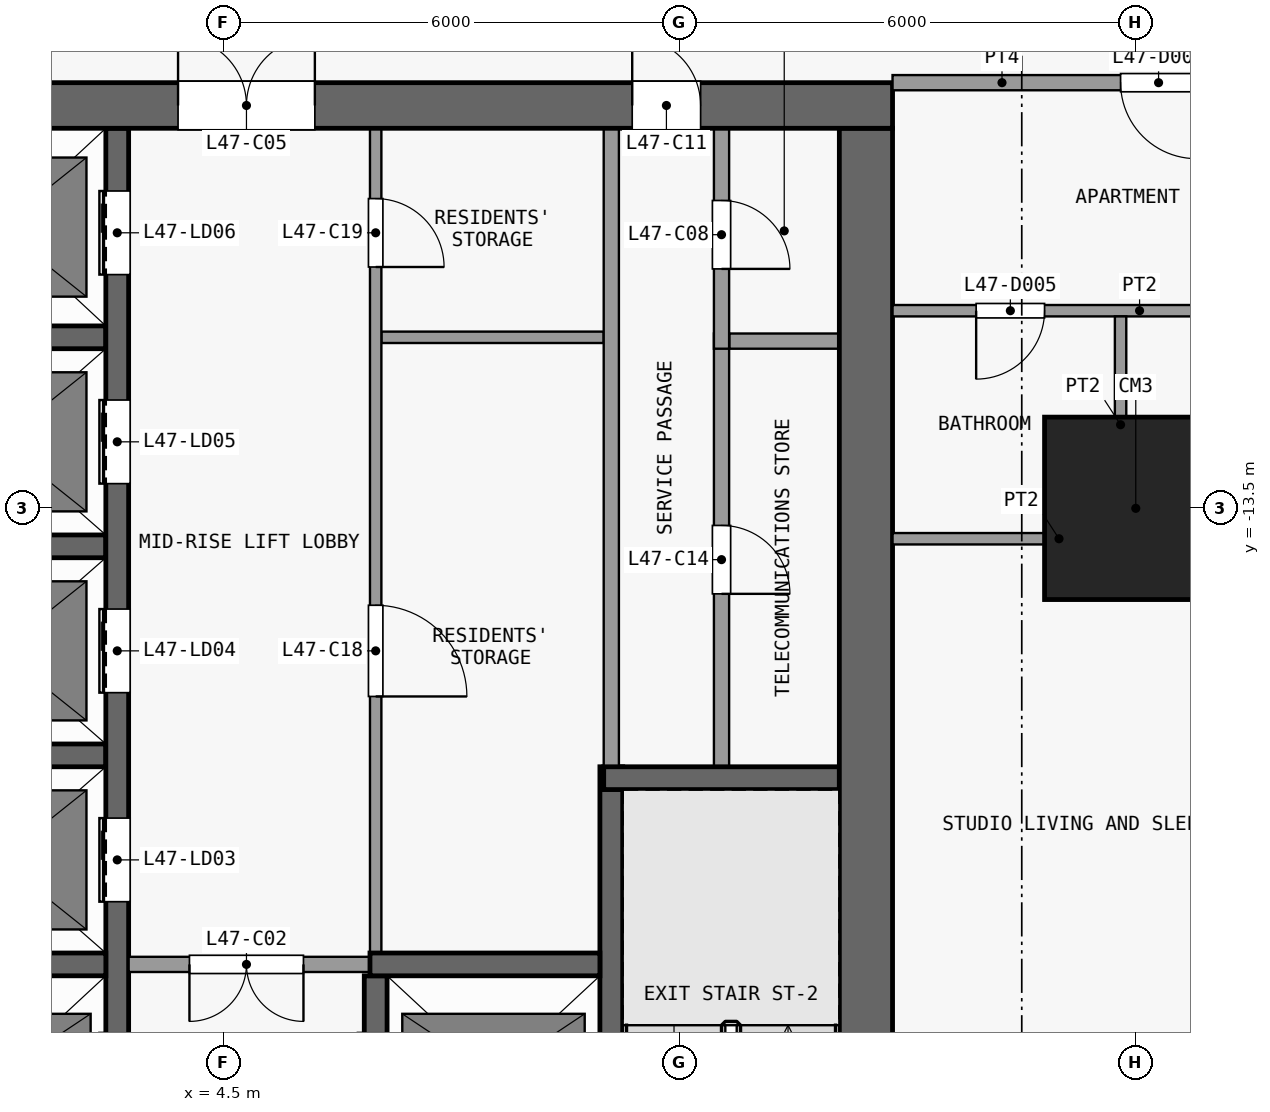
"""IFC4 building model, lengths in metres.
Left out: names, types, materials, properties, quantities, classifications, styles, units other than length and angle.
Written with IfcOpenShell. Run it as: python <this file> out.ifc"""

import sys

from ifc_helpers import new_model, si_unit, direction, frame, frame_2d, origin, origin_2d, place, context, subcontext, project, spatial, rectangle, extrude, element, fill, save


model = new_model("IFC4")
c1 = context("Model", 3, precision=1e-05, world=origin(), true_north=direction((0.0, 1.0)))
c2 = subcontext(c1, "Body", "Model", "MODEL_VIEW")
j1 = project(units=[si_unit("LENGTHUNIT", "METRE"), si_unit("PLANEANGLEUNIT", "RADIAN")], contexts=[c1])
p1 = place(None, origin())
s1 = spatial("IfcSite", under=j1, at=p1, CompositionType="ELEMENT")
p2 = place(p1, origin())
s2 = spatial("IfcBuilding", under=s1, at=p2, CompositionType="ELEMENT")
p3 = place(p2, frame((0.0, 0.0, 188.9)))
s3 = spatial("IfcBuildingStorey", under=s2, at=p3, CompositionType="ELEMENT", Elevation=188.9)
p4 = place(p3, frame((16.5, -13.5, 0.0), z_axis=(0.0, 0.0, 1.0), x_axis=(1.0, 0.0, 0.0)))
e1 = element("IfcColumn", 1, at=p4, inside=s3, PredefinedType="COLUMN", context=c2, shape_type="SweptSolid", body=[
    extrude(rectangle(XDim=2.4, YDim=2.4, at=origin_2d()), origin(), (0.0, 0.0, 1.0), 3.6),
])
p5 = place(p3, frame((-13.3, -8.2, 0.0), z_axis=(0.0, 0.0, 1.0), x_axis=(1.0, 0.0, 0.0)))
e2 = element("IfcWall", 2, at=p5, inside=s3, PredefinedType="SHEAR", context=c2, shape_type="SweptSolid", body=[
    extrude(rectangle(XDim=26.6, YDim=0.6, at=frame_2d((13.3, 0.0))), origin(), (0.0, 0.0, 1.0), 3.3),
])
p6 = place(p5, frame((7.6, 0.0, 0.0)))
e3 = element("IfcOpeningElement", 3, at=p6, cuts=e2, PredefinedType="OPENING", context=c2, shape_type="SweptSolid", body=[
    extrude(rectangle(XDim=1.8, YDim=2.1, at=frame_2d((0.9, 1.05))), frame((0.0, 0.31, 0.0), z_axis=(0.0, -1.0, 0.0), x_axis=(1.0, 0.0, 0.0)), (0.0, 0.0, 1.0), 0.62),
])
p7 = place(p5, frame((17.2, 0.0, 0.0)))
e4 = element("IfcOpeningElement", 4, at=p7, cuts=e2, PredefinedType="OPENING", context=c2, shape_type="SweptSolid", body=[
    extrude(rectangle(XDim=1.8, YDim=2.1, at=frame_2d((0.9, 1.05))), frame((0.0, 0.31, 0.0), z_axis=(0.0, -1.0, 0.0), x_axis=(1.0, 0.0, 0.0)), (0.0, 0.0, 1.0), 0.62),
])
p8 = place(p5, frame((2.525, 0.0, 0.0)))
e5 = element("IfcOpeningElement", 5, at=p8, cuts=e2, PredefinedType="OPENING", context=c2, shape_type="SweptSolid", body=[
    extrude(rectangle(XDim=0.9, YDim=2.1, at=frame_2d((0.45, 1.05))), frame((0.0, 0.31, 0.0), z_axis=(0.0, -1.0, 0.0), x_axis=(1.0, 0.0, 0.0)), (0.0, 0.0, 1.0), 0.62),
])
p9 = place(p5, frame((23.175, 0.0, 0.0)))
e6 = element("IfcOpeningElement", 6, at=p9, cuts=e2, PredefinedType="OPENING", context=c2, shape_type="SweptSolid", body=[
    extrude(rectangle(XDim=0.9, YDim=2.1, at=frame_2d((0.45, 1.05))), frame((0.0, 0.31, 0.0), z_axis=(0.0, -1.0, 0.0), x_axis=(1.0, 0.0, 0.0)), (0.0, 0.0, 1.0), 0.62),
])
p10 = place(p3, frame((12.95, -24.6, 0.0), z_axis=(0.0, 0.0, 1.0), x_axis=(0.0, 1.0, 0.0)))
e7 = element("IfcWall", 7, at=p10, inside=s3, PredefinedType="SHEAR", context=c2, shape_type="SweptSolid", body=[
    extrude(rectangle(XDim=16.1, YDim=0.7, at=frame_2d((8.05, 0.0))), origin(), (0.0, 0.0, 1.0), 3.3),
])
p11 = place(p3, frame((0.15, -19.5, 0.0), z_axis=(0.0, 0.0, 1.0), x_axis=(1.0, 0.0, 0.0)))
e8 = element("IfcWall", 8, at=p11, inside=s3, PredefinedType="SHEAR", context=c2, shape_type="SweptSolid", body=[
    extrude(rectangle(XDim=2.8, YDim=0.3, at=frame_2d((1.4, 0.0))), origin(), (0.0, 0.0, 1.0), 3.3),
])
p12 = place(p3, frame((6.575, -19.5, 0.0), z_axis=(0.0, 0.0, 1.0), x_axis=(-1.0, 0.0, 0.0)))
e9 = element("IfcWall", 9, at=p12, inside=s3, PredefinedType="PARTITIONING", context=c2, shape_type="SweptSolid", body=[
    extrude(rectangle(XDim=3.325, YDim=0.2, at=frame_2d((1.663, 0.0))), origin(), (0.0, 0.0, 1.0), 3.3),
])
p13 = place(p12, frame((1.025, 0.0, 0.0)))
e10 = element("IfcOpeningElement", 10, at=p13, cuts=e9, PredefinedType="OPENING", context=c2, shape_type="SweptSolid", body=[
    extrude(rectangle(XDim=1.5, YDim=2.1, at=frame_2d((0.75, 1.05))), frame((0.0, 0.11, 0.0), z_axis=(0.0, -1.0, 0.0), x_axis=(1.0, 0.0, 0.0)), (0.0, 0.0, 1.0), 0.22),
])
p14 = place(p3, frame((6.425, -19.5, 0.0), z_axis=(0.0, 0.0, 1.0), x_axis=(1.0, 0.0, 0.0)))
e11 = element("IfcWall", 11, at=p14, inside=s3, PredefinedType="SHEAR", context=c2, shape_type="SweptSolid", body=[
    extrude(rectangle(XDim=3.025, YDim=0.3, at=frame_2d((1.512, 0.0))), origin(), (0.0, 0.0, 1.0), 3.3),
])
p15 = place(p3, frame((9.5, -17.05, 0.0), z_axis=(0.0, 0.0, 1.0), x_axis=(1.0, 0.0, 0.0)))
e12 = element("IfcWall", 12, at=p15, inside=s3, PredefinedType="SHEAR", context=c2, shape_type="SweptSolid", body=[
    extrude(rectangle(XDim=3.1, YDim=0.3, at=frame_2d((1.55, 0.0))), origin(), (0.0, 0.0, 1.0), 3.3),
])
for number, where, z_axis, x_axis in (
    (13, (0.15, -16.75, 0.0), (0.0, 0.0, 1.0), (1.0, 0.0, 0.0)),
    (14, (0.15, -14.0, 0.0), (0.0, 0.0, 1.0), (1.0, 0.0, 0.0)),
):
    element("IfcWall", number, at=place(p3, frame(where, z_axis=z_axis, x_axis=x_axis)), inside=s3, PredefinedType="SHEAR", context=c2, shape_type="SweptSolid", body=[
        extrude(rectangle(XDim=2.8, YDim=0.3, at=frame_2d((1.4, 0.0))), origin(), (0.0, 0.0, 1.0), 3.3),
    ])
p16 = place(p3, frame((11.15, -11.3, 0.0), z_axis=(0.0, 0.0, 1.0), x_axis=(1.0, 0.0, 0.0)))
e15 = element("IfcWall", 15, at=p16, inside=s3, PredefinedType="PARTITIONING", context=c2, shape_type="SweptSolid", body=[
    extrude(rectangle(XDim=1.45, YDim=0.2, at=frame_2d((0.725, 0.0))), origin(), (0.0, 0.0, 1.0), 3.3),
])
p17 = place(p3, frame((0.15, -11.25, 0.0), z_axis=(0.0, 0.0, 1.0), x_axis=(1.0, 0.0, 0.0)))
e16 = element("IfcWall", 16, at=p17, inside=s3, PredefinedType="SHEAR", context=c2, shape_type="SweptSolid", body=[
    extrude(rectangle(XDim=2.8, YDim=0.3, at=frame_2d((1.4, 0.0))), origin(), (0.0, 0.0, 1.0), 3.3),
])
p18 = place(p3, frame((6.575, -11.25, 0.0), z_axis=(0.0, 0.0, 1.0), x_axis=(1.0, 0.0, 0.0)))
e17 = element("IfcWall", 17, at=p18, inside=s3, PredefinedType="PARTITIONING", context=c2, shape_type="SweptSolid", body=[
    extrude(rectangle(XDim=2.925, YDim=0.15, at=frame_2d((1.462, 0.0))), origin(), (0.0, 0.0, 1.0), 3.3),
])
p19 = place(p3, frame((3.1, -22.55, 0.0), z_axis=(0.0, 0.0, 1.0), x_axis=(0.0, 1.0, 0.0)))
e18 = element("IfcWall", 18, at=p19, inside=s3, PredefinedType="SHEAR", context=c2, shape_type="SweptSolid", body=[
    extrude(rectangle(XDim=14.05, YDim=0.3, at=frame_2d((7.025, 0.0))), origin(), (0.0, 0.0, 1.0), 3.3),
])
p20 = place(p19, frame((1.05, 0.0, 0.0)))
e19 = element("IfcOpeningElement", 19, at=p20, cuts=e18, PredefinedType="OPENING", context=c2, shape_type="SweptSolid", body=[
    extrude(rectangle(XDim=1.1, YDim=2.1, at=frame_2d((0.55, 1.05))), frame((0.0, 0.16, 0.0), z_axis=(0.0, -1.0, 0.0), x_axis=(1.0, 0.0, 0.0)), (0.0, 0.0, 1.0), 0.32),
])
p21 = place(p19, frame((3.875, 0.0, 0.0)))
e20 = element("IfcOpeningElement", 20, at=p21, cuts=e18, PredefinedType="OPENING", context=c2, shape_type="SweptSolid", body=[
    extrude(rectangle(XDim=1.1, YDim=2.1, at=frame_2d((0.55, 1.05))), frame((0.0, 0.16, 0.0), z_axis=(0.0, -1.0, 0.0), x_axis=(1.0, 0.0, 0.0)), (0.0, 0.0, 1.0), 0.32),
])
p22 = place(p19, frame((6.625, 0.0, 0.0)))
e21 = element("IfcOpeningElement", 21, at=p22, cuts=e18, PredefinedType="OPENING", context=c2, shape_type="SweptSolid", body=[
    extrude(rectangle(XDim=1.1, YDim=2.1, at=frame_2d((0.55, 1.05))), frame((0.0, 0.16, 0.0), z_axis=(0.0, -1.0, 0.0), x_axis=(1.0, 0.0, 0.0)), (0.0, 0.0, 1.0), 0.32),
])
p23 = place(p19, frame((9.375, 0.0, 0.0)))
e22 = element("IfcOpeningElement", 22, at=p23, cuts=e18, PredefinedType="OPENING", context=c2, shape_type="SweptSolid", body=[
    extrude(rectangle(XDim=1.1, YDim=2.1, at=frame_2d((0.55, 1.05))), frame((0.0, 0.16, 0.0), z_axis=(0.0, -1.0, 0.0), x_axis=(1.0, 0.0, 0.0)), (0.0, 0.0, 1.0), 0.32),
])
p24 = place(p19, frame((12.125, 0.0, 0.0)))
e23 = element("IfcOpeningElement", 23, at=p24, cuts=e18, PredefinedType="OPENING", context=c2, shape_type="SweptSolid", body=[
    extrude(rectangle(XDim=1.1, YDim=2.1, at=frame_2d((0.55, 1.05))), frame((0.0, 0.16, 0.0), z_axis=(0.0, -1.0, 0.0), x_axis=(1.0, 0.0, 0.0)), (0.0, 0.0, 1.0), 0.32),
])
p25 = place(p3, frame((6.5, -22.25, 0.0), z_axis=(0.0, 0.0, 1.0), x_axis=(0.0, 1.0, 0.0)))
e24 = element("IfcWall", 24, at=p25, inside=s3, PredefinedType="SHEAR", context=c2, shape_type="SweptSolid", body=[
    extrude(rectangle(XDim=2.6, YDim=0.3, at=frame_2d((1.3, 0.0))), origin(), (0.0, 0.0, 1.0), 3.3),
])
p26 = place(p25, frame((0.75, 0.0, 0.0)))
e25 = element("IfcOpeningElement", 25, at=p26, cuts=e24, PredefinedType="OPENING", context=c2, shape_type="SweptSolid", body=[
    extrude(rectangle(XDim=1.1, YDim=2.1, at=frame_2d((0.55, 1.05))), frame((0.0, 0.16, 0.0), z_axis=(0.0, -1.0, 0.0), x_axis=(1.0, 0.0, 0.0)), (0.0, 0.0, 1.0), 0.32),
])
p27 = place(p3, frame((6.5, -8.5, 0.0), z_axis=(0.0, 0.0, 1.0), x_axis=(0.0, -1.0, 0.0)))
e26 = element("IfcWall", 26, at=p27, inside=s3, PredefinedType="PARTITIONING", context=c2, shape_type="SweptSolid", body=[
    extrude(rectangle(XDim=10.85, YDim=0.15, at=frame_2d((5.425, 0.0))), origin(), (0.0, 0.0, 1.0), 3.3),
])
p28 = place(p27, frame((6.275, 0.0, 0.0)))
e27 = element("IfcOpeningElement", 27, at=p28, cuts=e26, PredefinedType="OPENING", context=c2, shape_type="SweptSolid", body=[
    extrude(rectangle(XDim=1.2, YDim=2.1, at=frame_2d((0.6, 1.05))), frame((0.0, 0.085, 0.0), z_axis=(0.0, -1.0, 0.0), x_axis=(1.0, 0.0, 0.0)), (0.0, 0.0, 1.0), 0.17),
])
p29 = place(p27, frame((0.925, 0.0, 0.0)))
e28 = element("IfcOpeningElement", 28, at=p29, cuts=e26, PredefinedType="OPENING", context=c2, shape_type="SweptSolid", body=[
    extrude(rectangle(XDim=0.9, YDim=2.1, at=frame_2d((0.45, 1.05))), frame((0.0, 0.085, 0.0), z_axis=(0.0, -1.0, 0.0), x_axis=(1.0, 0.0, 0.0)), (0.0, 0.0, 1.0), 0.17),
])
p30 = place(p3, frame((9.6, -16.9, 0.0), z_axis=(0.0, 0.0, 1.0), x_axis=(0.0, -1.0, 0.0)))
e29 = element("IfcWall", 29, at=p30, inside=s3, PredefinedType="SHEAR", context=c2, shape_type="SweptSolid", body=[
    extrude(rectangle(XDim=7.7, YDim=0.3, at=frame_2d((3.85, 0.0))), origin(), (0.0, 0.0, 1.0), 3.3),
])
p31 = place(p30, frame((6.5, 0.0, 0.0)))
e30 = element("IfcOpeningElement", 30, at=p31, cuts=e29, PredefinedType="OPENING", context=c2, shape_type="SweptSolid", body=[
    extrude(rectangle(XDim=1.1, YDim=2.1, at=frame_2d((0.55, 1.05))), frame((0.0, 0.16, 0.0), z_axis=(0.0, -1.0, 0.0), x_axis=(1.0, 0.0, 0.0)), (0.0, 0.0, 1.0), 0.32),
])
p32 = place(p3, frame((9.6, -16.9, 0.0), z_axis=(0.0, 0.0, 1.0), x_axis=(0.0, 1.0, 0.0)))
e31 = element("IfcWall", 31, at=p32, inside=s3, PredefinedType="PARTITIONING", context=c2, shape_type="SweptSolid", body=[
    extrude(rectangle(XDim=8.4, YDim=0.2, at=frame_2d((4.2, 0.0))), origin(), (0.0, 0.0, 1.0), 3.3),
])
p33 = place(p3, frame((11.05, -11.2, 0.0), z_axis=(0.0, 0.0, 1.0), x_axis=(0.0, -1.0, 0.0)))
e32 = element("IfcWall", 32, at=p33, inside=s3, PredefinedType="PARTITIONING", context=c2, shape_type="SweptSolid", body=[
    extrude(rectangle(XDim=5.7, YDim=0.2, at=frame_2d((2.85, 0.0))), origin(), (0.0, 0.0, 1.0), 3.3),
])
p34 = place(p33, frame((2.525, 0.0, 0.0)))
e33 = element("IfcOpeningElement", 33, at=p34, cuts=e32, PredefinedType="OPENING", context=c2, shape_type="SweptSolid", body=[
    extrude(rectangle(XDim=0.9, YDim=2.1, at=frame_2d((0.45, 1.05))), frame((0.0, 0.11, 0.0), z_axis=(0.0, -1.0, 0.0), x_axis=(1.0, 0.0, 0.0)), (0.0, 0.0, 1.0), 0.22),
])
p35 = place(p3, frame((11.05, -8.5, 0.0), z_axis=(0.0, 0.0, 1.0), x_axis=(0.0, -1.0, 0.0)))
e34 = element("IfcWall", 34, at=p35, inside=s3, PredefinedType="PARTITIONING", context=c2, shape_type="SweptSolid", body=[
    extrude(rectangle(XDim=2.9, YDim=0.2, at=frame_2d((1.45, 0.0))), origin(), (0.0, 0.0, 1.0), 3.3),
])
p36 = place(p35, frame((0.95, 0.0, 0.0)))
e35 = element("IfcOpeningElement", 35, at=p36, cuts=e34, PredefinedType="OPENING", context=c2, shape_type="SweptSolid", body=[
    extrude(rectangle(XDim=0.9, YDim=2.1, at=frame_2d((0.45, 1.05))), frame((0.0, 0.11, 0.0), z_axis=(0.0, -1.0, 0.0), x_axis=(1.0, 0.0, 0.0)), (0.0, 0.0, 1.0), 0.22),
])
p37 = place(p3, frame((13.3, -13.9, 0.0), z_axis=(0.0, 0.0, 1.0), x_axis=(1.0, 0.0, 0.0)))
e36 = element("IfcWall", 36, at=p37, inside=s3, PredefinedType="PARTITIONING", context=c2, shape_type="SweptSolid", body=[
    extrude(rectangle(XDim=5.962, YDim=0.15, at=frame_2d((2.981, 0.0))), origin(), (0.0, 0.0, 1.0), 3.3),
])
p38 = place(p37, frame((4.5, 0.0, 0.0)))
e37 = element("IfcOpeningElement", 37, at=p38, cuts=e36, PredefinedType="OPENING", context=c2, shape_type="SweptSolid", body=[
    extrude(rectangle(XDim=0.9, YDim=2.1, at=frame_2d((0.45, 1.05))), frame((0.0, 0.085, 0.0), z_axis=(0.0, -1.0, 0.0), x_axis=(1.0, 0.0, 0.0)), (0.0, 0.0, 1.0), 0.17),
])
p39 = place(p3, frame((13.3, -10.9, 0.0), z_axis=(0.0, 0.0, 1.0), x_axis=(1.0, 0.0, 0.0)))
e38 = element("IfcWall", 38, at=p39, inside=s3, PredefinedType="PARTITIONING", context=c2, shape_type="SweptSolid", body=[
    extrude(rectangle(XDim=6.863, YDim=0.15, at=frame_2d((3.431, 0.0))), origin(), (0.0, 0.0, 1.0), 3.3),
])
p40 = place(p39, frame((1.1, 0.0, 0.0)))
e39 = element("IfcOpeningElement", 39, at=p40, cuts=e38, PredefinedType="OPENING", context=c2, shape_type="SweptSolid", body=[
    extrude(rectangle(XDim=0.9, YDim=2.1, at=frame_2d((0.45, 1.05))), frame((0.0, 0.085, 0.0), z_axis=(0.0, -1.0, 0.0), x_axis=(1.0, 0.0, 0.0)), (0.0, 0.0, 1.0), 0.17),
])
p41 = place(p39, frame((4.5, 0.0, 0.0)))
e40 = element("IfcOpeningElement", 40, at=p41, cuts=e38, PredefinedType="OPENING", context=c2, shape_type="SweptSolid", body=[
    extrude(rectangle(XDim=0.9, YDim=2.1, at=frame_2d((0.45, 1.05))), frame((0.0, 0.085, 0.0), z_axis=(0.0, -1.0, 0.0), x_axis=(1.0, 0.0, 0.0)), (0.0, 0.0, 1.0), 0.17),
])
p42 = place(p3, frame((13.3, -7.9, 0.0), z_axis=(0.0, 0.0, 1.0), x_axis=(1.0, 0.0, 0.0)))
e41 = element("IfcWall", 41, at=p42, inside=s3, PredefinedType="PARTITIONING", context=c2, shape_type="SweptSolid", body=[
    extrude(rectangle(XDim=6.863, YDim=0.2, at=frame_2d((3.431, 0.0))), origin(), (0.0, 0.0, 1.0), 3.3),
])
p43 = place(p42, frame((3.0, 0.0, 0.0)))
e42 = element("IfcOpeningElement", 42, at=p43, cuts=e41, PredefinedType="OPENING", context=c2, shape_type="SweptSolid", body=[
    extrude(rectangle(XDim=1.0, YDim=2.1, at=frame_2d((0.5, 1.05))), frame((0.0, 0.11, 0.0), z_axis=(0.0, -1.0, 0.0), x_axis=(1.0, 0.0, 0.0)), (0.0, 0.0, 1.0), 0.22),
])
p44 = place(p3, frame((16.3, -13.825, 0.0), z_axis=(0.0, 0.0, 1.0), x_axis=(0.0, 1.0, 0.0)))
e43 = element("IfcWall", 43, at=p44, inside=s3, PredefinedType="PARTITIONING", context=c2, shape_type="SweptSolid", body=[
    extrude(rectangle(XDim=2.85, YDim=0.15, at=frame_2d((1.425, 0.0))), origin(), (0.0, 0.0, 1.0), 3.3),
])
p45 = place(p21, origin())
e44 = element("IfcDoor", 44, at=p45, inside=s3, OperationType="DOUBLE_DOOR_SLIDING", PredefinedType="DOOR", context=c2, shape_type="SweptSolid", body=[
    extrude(rectangle(XDim=1.1, YDim=2.1, at=frame_2d((0.55, 1.05))), frame((0.0, 0.025, 0.0), z_axis=(0.0, -1.0, 0.0), x_axis=(1.0, 0.0, 0.0)), (0.0, 0.0, 1.0), 0.05),
])
fill(e20, e44)
p46 = place(p22, origin())
e45 = element("IfcDoor", 45, at=p46, inside=s3, OperationType="DOUBLE_DOOR_SLIDING", PredefinedType="DOOR", context=c2, shape_type="SweptSolid", body=[
    extrude(rectangle(XDim=1.1, YDim=2.1, at=frame_2d((0.55, 1.05))), frame((0.0, 0.025, 0.0), z_axis=(0.0, -1.0, 0.0), x_axis=(1.0, 0.0, 0.0)), (0.0, 0.0, 1.0), 0.05),
])
fill(e21, e45)
p47 = place(p23, origin())
e46 = element("IfcDoor", 46, at=p47, inside=s3, OperationType="DOUBLE_DOOR_SLIDING", PredefinedType="DOOR", context=c2, shape_type="SweptSolid", body=[
    extrude(rectangle(XDim=1.1, YDim=2.1, at=frame_2d((0.55, 1.05))), frame((0.0, 0.025, 0.0), z_axis=(0.0, -1.0, 0.0), x_axis=(1.0, 0.0, 0.0)), (0.0, 0.0, 1.0), 0.05),
])
fill(e22, e46)
p48 = place(p24, origin())
e47 = element("IfcDoor", 47, at=p48, inside=s3, OperationType="DOUBLE_DOOR_SLIDING", PredefinedType="DOOR", context=c2, shape_type="SweptSolid", body=[
    extrude(rectangle(XDim=1.1, YDim=2.1, at=frame_2d((0.55, 1.05))), frame((0.0, 0.025, 0.0), z_axis=(0.0, -1.0, 0.0), x_axis=(1.0, 0.0, 0.0)), (0.0, 0.0, 1.0), 0.05),
])
fill(e23, e47)
p49 = place(p13, origin())
e48 = element("IfcDoor", 48, at=p49, inside=s3, OperationType="DOUBLE_DOOR_SINGLE_SWING", PredefinedType="DOOR", context=c2, shape_type="SweptSolid", body=[
    extrude(rectangle(XDim=1.5, YDim=2.1, at=frame_2d((0.75, 1.05))), frame((0.0, 0.025, 0.0), z_axis=(0.0, -1.0, 0.0), x_axis=(1.0, 0.0, 0.0)), (0.0, 0.0, 1.0), 0.05),
])
fill(e10, e48)
p50 = place(p7, origin())
e49 = element("IfcDoor", 49, at=p50, inside=s3, OperationType="DOUBLE_DOOR_SINGLE_SWING", PredefinedType="DOOR", context=c2, shape_type="SweptSolid", body=[
    extrude(rectangle(XDim=1.8, YDim=2.1, at=frame_2d((0.9, 1.05))), frame((0.0, 0.025, 0.0), z_axis=(0.0, -1.0, 0.0), x_axis=(1.0, 0.0, 0.0)), (0.0, 0.0, 1.0), 0.05),
])
fill(e4, e49)
p51 = place(p36, origin())
e50 = element("IfcDoor", 50, at=p51, inside=s3, OperationType="SINGLE_SWING_RIGHT", PredefinedType="DOOR", context=c2, shape_type="SweptSolid", body=[
    extrude(rectangle(XDim=0.9, YDim=2.1, at=frame_2d((0.45, 1.05))), frame((0.0, 0.025, 0.0), z_axis=(0.0, -1.0, 0.0), x_axis=(1.0, 0.0, 0.0)), (0.0, 0.0, 1.0), 0.05),
])
fill(e35, e50)
p52 = place(p9, origin())
e51 = element("IfcDoor", 51, at=p52, inside=s3, OperationType="SINGLE_SWING_LEFT", PredefinedType="DOOR", context=c2, shape_type="SweptSolid", body=[
    extrude(rectangle(XDim=0.9, YDim=2.1, at=frame_2d((0.45, 1.05))), frame((0.0, 0.025, 0.0), z_axis=(0.0, -1.0, 0.0), x_axis=(1.0, 0.0, 0.0)), (0.0, 0.0, 1.0), 0.05),
])
fill(e6, e51)
p53 = place(p34, origin())
e52 = element("IfcDoor", 52, at=p53, inside=s3, OperationType="SINGLE_SWING_RIGHT", PredefinedType="DOOR", context=c2, shape_type="SweptSolid", body=[
    extrude(rectangle(XDim=0.9, YDim=2.1, at=frame_2d((0.45, 1.05))), frame((0.0, 0.025, 0.0), z_axis=(0.0, -1.0, 0.0), x_axis=(1.0, 0.0, 0.0)), (0.0, 0.0, 1.0), 0.05),
])
fill(e33, e52)
p54 = place(p28, origin())
e53 = element("IfcDoor", 53, at=p54, inside=s3, OperationType="SINGLE_SWING_RIGHT", PredefinedType="DOOR", context=c2, shape_type="SweptSolid", body=[
    extrude(rectangle(XDim=1.2, YDim=2.1, at=frame_2d((0.6, 1.05))), frame((0.0, 0.025, 0.0), z_axis=(0.0, -1.0, 0.0), x_axis=(1.0, 0.0, 0.0)), (0.0, 0.0, 1.0), 0.05),
])
fill(e27, e53)
p55 = place(p29, origin())
e54 = element("IfcDoor", 54, at=p55, inside=s3, OperationType="SINGLE_SWING_RIGHT", PredefinedType="DOOR", context=c2, shape_type="SweptSolid", body=[
    extrude(rectangle(XDim=0.9, YDim=2.1, at=frame_2d((0.45, 1.05))), frame((0.0, 0.025, 0.0), z_axis=(0.0, -1.0, 0.0), x_axis=(1.0, 0.0, 0.0)), (0.0, 0.0, 1.0), 0.05),
])
fill(e28, e54)
p56 = place(p40, origin())
e55 = element("IfcDoor", 55, at=p56, inside=s3, OperationType="SINGLE_SWING_LEFT", PredefinedType="DOOR", context=c2, shape_type="SweptSolid", body=[
    extrude(rectangle(XDim=0.9, YDim=2.1, at=frame_2d((0.45, 1.05))), frame((0.0, 0.025, 0.0), z_axis=(0.0, -1.0, 0.0), x_axis=(1.0, 0.0, 0.0)), (0.0, 0.0, 1.0), 0.05),
])
fill(e39, e55)
p57 = place(p43, origin())
e56 = element("IfcDoor", 56, at=p57, inside=s3, OperationType="SINGLE_SWING_RIGHT", PredefinedType="DOOR", context=c2, shape_type="SweptSolid", body=[
    extrude(rectangle(XDim=1.0, YDim=2.1, at=frame_2d((0.5, 1.05))), frame((0.0, 0.025, 0.0), z_axis=(0.0, -1.0, 0.0), x_axis=(1.0, 0.0, 0.0)), (0.0, 0.0, 1.0), 0.05),
])
fill(e42, e56)
save(model, sys.argv[1])
